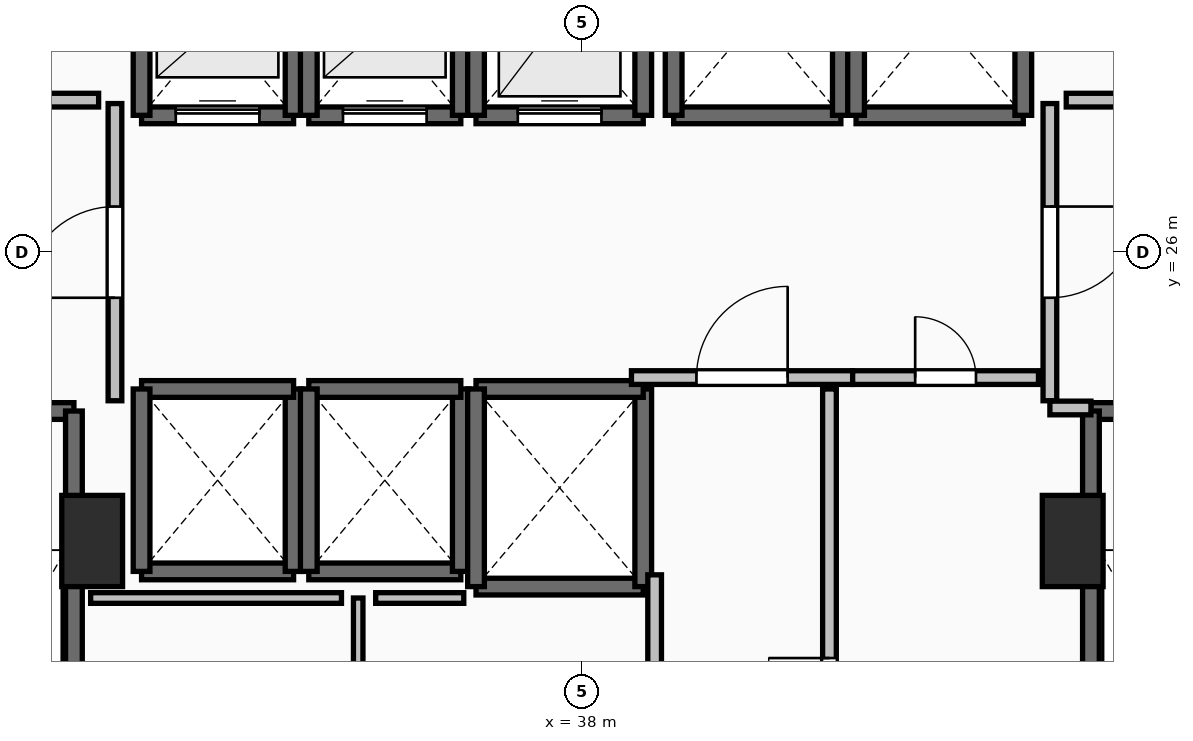
"""IFC4 building model, lengths in metres.
Left out: names, types, materials, properties, quantities, classifications, styles, units other than length and angle.
Written with IfcOpenShell. Run it as: python <this file> out.ifc"""

import sys

from ifc_helpers import new_model, si_unit, direction, frame, frame_2d, origin, origin_2d, place, context, subcontext, project, spatial, rectangle, extrude, element, fill, save


model = new_model("IFC4")
c1 = context("Model", 3, precision=1e-05, world=origin(), true_north=direction((0.0, 1.0)))
c2 = subcontext(c1, "Body", "Model", "MODEL_VIEW")
j1 = project(units=[si_unit("LENGTHUNIT", "METRE"), si_unit("PLANEANGLEUNIT", "RADIAN")], contexts=[c1])
p1 = place(None, origin())
s1 = spatial("IfcSite", under=j1, at=p1, CompositionType="ELEMENT")
p2 = place(p1, origin())
s2 = spatial("IfcBuilding", under=s1, at=p2, CompositionType="ELEMENT")
p3 = place(p2, frame((0.0, 0.0, 59.0)))
s3 = spatial("IfcBuildingStorey", under=s2, at=p3, CompositionType="ELEMENT", Elevation=59.0)
for number, where, z_axis, x_axis in (
    (1, (31.55, 22.2, 0.0), (0.0, 0.0, 1.0), (1.0, 0.0, 0.0)),
    (2, (44.45, 22.2, 0.0), (0.0, 0.0, 1.0), (1.0, 0.0, 0.0)),
):
    element("IfcColumn", number, at=place(p3, frame(where, z_axis=z_axis, x_axis=x_axis)), inside=s3, PredefinedType="PILASTER", context=c2, shape_type="SweptSolid", body=[
        extrude(rectangle(XDim=0.8, YDim=1.2, at=origin_2d()), origin(), (0.0, 0.0, 1.0), 3.5),
    ])
p4 = place(p3, frame((27.94, 23.91, 0.0), z_axis=(0.0, 0.0, 1.0), x_axis=(1.0, 0.0, 0.0)))
e3 = element("IfcWall", 3, at=p4, inside=s3, PredefinedType="SOLIDWALL", context=c2, shape_type="SweptSolid", body=[
    extrude(rectangle(XDim=3.37, YDim=0.22, at=frame_2d((1.685, 0.0))), origin(), (0.0, 0.0, 1.0), 3.24),
])
p5 = place(p4, frame((1.135, 0.0, 0.0)))
e4 = element("IfcOpeningElement", 4, at=p5, cuts=e3, PredefinedType="OPENING", context=c2, shape_type="SweptSolid", body=[
    extrude(rectangle(XDim=1.1, YDim=2.15, at=frame_2d((0.55, 1.075))), frame((0.0, 0.125, 0.0), z_axis=(0.0, -1.0, 0.0), x_axis=(1.0, 0.0, 0.0)), (0.0, 0.0, 1.0), 0.25),
])
p6 = place(p3, frame((31.31, 23.91, 0.0), z_axis=(0.0, 0.0, 1.0), x_axis=(0.0, -1.0, 0.0)))
e5 = element("IfcWall", 5, at=p6, inside=s3, PredefinedType="SOLIDWALL", context=c2, shape_type="SweptSolid", body=[
    extrude(rectangle(XDim=7.42, YDim=0.22, at=frame_2d((3.71, 0.0))), origin(), (0.0, 0.0, 1.0), 3.24),
])
p7 = place(p3, frame((44.69, 23.91, 0.0), z_axis=(0.0, 0.0, 1.0), x_axis=(1.0, 0.0, 0.0)))
e6 = element("IfcWall", 6, at=p7, inside=s3, PredefinedType="SOLIDWALL", context=c2, shape_type="SweptSolid", body=[
    extrude(rectangle(XDim=3.37, YDim=0.22, at=frame_2d((1.685, 0.0))), origin(), (0.0, 0.0, 1.0), 3.24),
])
p8 = place(p7, frame((1.135, 0.0, 0.0)))
e7 = element("IfcOpeningElement", 7, at=p8, cuts=e6, PredefinedType="OPENING", context=c2, shape_type="SweptSolid", body=[
    extrude(rectangle(XDim=1.1, YDim=2.15, at=frame_2d((0.55, 1.075))), frame((0.0, 0.125, 0.0), z_axis=(0.0, -1.0, 0.0), x_axis=(1.0, 0.0, 0.0)), (0.0, 0.0, 1.0), 0.25),
])
p9 = place(p3, frame((44.69, 16.49, 0.0), z_axis=(0.0, 0.0, 1.0), x_axis=(0.0, 1.0, 0.0)))
e8 = element("IfcWall", 8, at=p9, inside=s3, PredefinedType="SOLIDWALL", context=c2, shape_type="SweptSolid", body=[
    extrude(rectangle(XDim=7.42, YDim=0.22, at=frame_2d((3.71, 0.0))), origin(), (0.0, 0.0, 1.0), 3.24),
])
p10 = place(p3, frame((32.2, 27.8, 0.0), z_axis=(0.0, 0.0, 1.0), x_axis=(1.0, 0.0, 0.0)))
e9 = element("IfcWall", 9, at=p10, inside=s3, PredefinedType="SOLIDWALL", context=c2, shape_type="SweptSolid", body=[
    extrude(rectangle(XDim=2.0, YDim=0.22, at=frame_2d((1.0, 0.0))), origin(), (0.0, 0.0, 1.0), 3.24),
])
p11 = place(p10, frame((0.45, 0.0, 0.0)))
e10 = element("IfcOpeningElement", 10, at=p11, cuts=e9, PredefinedType="OPENING", context=c2, shape_type="SweptSolid", body=[
    extrude(rectangle(XDim=1.1, YDim=2.2, at=frame_2d((0.55, 1.1))), frame((0.0, 0.125, 0.0), z_axis=(0.0, -1.0, 0.0), x_axis=(1.0, 0.0, 0.0)), (0.0, 0.0, 1.0), 0.25),
])
for number, where, z_axis, x_axis in (
    (11, (34.2, 27.8, 0.0), (0.0, 0.0, 1.0), (0.0, 1.0, 0.0)),
    (12, (32.2, 30.2, 0.0), (0.0, 0.0, 1.0), (0.0, -1.0, 0.0)),
):
    element("IfcWall", number, at=place(p3, frame(where, z_axis=z_axis, x_axis=x_axis)), inside=s3, PredefinedType="SOLIDWALL", context=c2, shape_type="SweptSolid", body=[
        extrude(rectangle(XDim=2.4, YDim=0.22, at=frame_2d((1.2, 0.0))), origin(), (0.0, 0.0, 1.0), 3.24),
    ])
p12 = place(p3, frame((34.4, 27.8, 0.0), z_axis=(0.0, 0.0, 1.0), x_axis=(1.0, 0.0, 0.0)))
e13 = element("IfcWall", 13, at=p12, inside=s3, PredefinedType="SOLIDWALL", context=c2, shape_type="SweptSolid", body=[
    extrude(rectangle(XDim=2.0, YDim=0.22, at=frame_2d((1.0, 0.0))), origin(), (0.0, 0.0, 1.0), 3.24),
])
p13 = place(p12, frame((0.45, 0.0, 0.0)))
e14 = element("IfcOpeningElement", 14, at=p13, cuts=e13, PredefinedType="OPENING", context=c2, shape_type="SweptSolid", body=[
    extrude(rectangle(XDim=1.1, YDim=2.2, at=frame_2d((0.55, 1.1))), frame((0.0, 0.125, 0.0), z_axis=(0.0, -1.0, 0.0), x_axis=(1.0, 0.0, 0.0)), (0.0, 0.0, 1.0), 0.25),
])
for number, where, z_axis, x_axis in (
    (15, (36.4, 27.8, 0.0), (0.0, 0.0, 1.0), (0.0, 1.0, 0.0)),
    (16, (34.4, 30.2, 0.0), (0.0, 0.0, 1.0), (0.0, -1.0, 0.0)),
):
    element("IfcWall", number, at=place(p3, frame(where, z_axis=z_axis, x_axis=x_axis)), inside=s3, PredefinedType="SOLIDWALL", context=c2, shape_type="SweptSolid", body=[
        extrude(rectangle(XDim=2.4, YDim=0.22, at=frame_2d((1.2, 0.0))), origin(), (0.0, 0.0, 1.0), 3.24),
    ])
p14 = place(p3, frame((36.6, 27.8, 0.0), z_axis=(0.0, 0.0, 1.0), x_axis=(1.0, 0.0, 0.0)))
e17 = element("IfcWall", 17, at=p14, inside=s3, PredefinedType="SOLIDWALL", context=c2, shape_type="SweptSolid", body=[
    extrude(rectangle(XDim=2.2, YDim=0.22, at=frame_2d((1.1, 0.0))), origin(), (0.0, 0.0, 1.0), 3.24),
])
p15 = place(p14, frame((0.55, 0.0, 0.0)))
e18 = element("IfcOpeningElement", 18, at=p15, cuts=e17, PredefinedType="OPENING", context=c2, shape_type="SweptSolid", body=[
    extrude(rectangle(XDim=1.1, YDim=2.2, at=frame_2d((0.55, 1.1))), frame((0.0, 0.125, 0.0), z_axis=(0.0, -1.0, 0.0), x_axis=(1.0, 0.0, 0.0)), (0.0, 0.0, 1.0), 0.25),
])
for number, where, z_axis, x_axis in (
    (19, (38.8, 27.8, 0.0), (0.0, 0.0, 1.0), (0.0, 1.0, 0.0)),
    (20, (36.6, 30.4, 0.0), (0.0, 0.0, 1.0), (0.0, -1.0, 0.0)),
):
    element("IfcWall", number, at=place(p3, frame(where, z_axis=z_axis, x_axis=x_axis)), inside=s3, PredefinedType="SOLIDWALL", context=c2, shape_type="SweptSolid", body=[
        extrude(rectangle(XDim=2.6, YDim=0.22, at=frame_2d((1.3, 0.0))), origin(), (0.0, 0.0, 1.0), 3.24),
    ])
p16 = place(p3, frame((32.2, 21.8, 0.0), z_axis=(0.0, 0.0, 1.0), x_axis=(1.0, 0.0, 0.0)))
e21 = element("IfcWall", 21, at=p16, inside=s3, PredefinedType="SOLIDWALL", context=c2, shape_type="SweptSolid", body=[
    extrude(rectangle(XDim=2.0, YDim=0.22, at=frame_2d((1.0, 0.0))), origin(), (0.0, 0.0, 1.0), 3.24),
])
p17 = place(p3, frame((34.2, 21.8, 0.0), z_axis=(0.0, 0.0, 1.0), x_axis=(0.0, 1.0, 0.0)))
e22 = element("IfcWall", 22, at=p17, inside=s3, PredefinedType="SOLIDWALL", context=c2, shape_type="SweptSolid", body=[
    extrude(rectangle(XDim=2.4, YDim=0.22, at=frame_2d((1.2, 0.0))), origin(), (0.0, 0.0, 1.0), 3.24),
])
p18 = place(p3, frame((34.2, 24.2, 0.0), z_axis=(0.0, 0.0, 1.0), x_axis=(-1.0, 0.0, 0.0)))
e23 = element("IfcWall", 23, at=p18, inside=s3, PredefinedType="SOLIDWALL", context=c2, shape_type="SweptSolid", body=[
    extrude(rectangle(XDim=2.0, YDim=0.22, at=frame_2d((1.0, 0.0))), origin(), (0.0, 0.0, 1.0), 3.24),
])
p19 = place(p3, frame((32.2, 24.2, 0.0), z_axis=(0.0, 0.0, 1.0), x_axis=(0.0, -1.0, 0.0)))
e24 = element("IfcWall", 24, at=p19, inside=s3, PredefinedType="SOLIDWALL", context=c2, shape_type="SweptSolid", body=[
    extrude(rectangle(XDim=2.4, YDim=0.22, at=frame_2d((1.2, 0.0))), origin(), (0.0, 0.0, 1.0), 3.24),
])
p20 = place(p3, frame((34.4, 21.8, 0.0), z_axis=(0.0, 0.0, 1.0), x_axis=(1.0, 0.0, 0.0)))
e25 = element("IfcWall", 25, at=p20, inside=s3, PredefinedType="SOLIDWALL", context=c2, shape_type="SweptSolid", body=[
    extrude(rectangle(XDim=2.0, YDim=0.22, at=frame_2d((1.0, 0.0))), origin(), (0.0, 0.0, 1.0), 3.24),
])
p21 = place(p3, frame((36.4, 21.8, 0.0), z_axis=(0.0, 0.0, 1.0), x_axis=(0.0, 1.0, 0.0)))
e26 = element("IfcWall", 26, at=p21, inside=s3, PredefinedType="SOLIDWALL", context=c2, shape_type="SweptSolid", body=[
    extrude(rectangle(XDim=2.4, YDim=0.22, at=frame_2d((1.2, 0.0))), origin(), (0.0, 0.0, 1.0), 3.24),
])
p22 = place(p3, frame((36.4, 24.2, 0.0), z_axis=(0.0, 0.0, 1.0), x_axis=(-1.0, 0.0, 0.0)))
e27 = element("IfcWall", 27, at=p22, inside=s3, PredefinedType="SOLIDWALL", context=c2, shape_type="SweptSolid", body=[
    extrude(rectangle(XDim=2.0, YDim=0.22, at=frame_2d((1.0, 0.0))), origin(), (0.0, 0.0, 1.0), 3.24),
])
p23 = place(p3, frame((34.4, 24.2, 0.0), z_axis=(0.0, 0.0, 1.0), x_axis=(0.0, -1.0, 0.0)))
e28 = element("IfcWall", 28, at=p23, inside=s3, PredefinedType="SOLIDWALL", context=c2, shape_type="SweptSolid", body=[
    extrude(rectangle(XDim=2.4, YDim=0.22, at=frame_2d((1.2, 0.0))), origin(), (0.0, 0.0, 1.0), 3.24),
])
p24 = place(p3, frame((36.6, 21.6, 0.0), z_axis=(0.0, 0.0, 1.0), x_axis=(1.0, 0.0, 0.0)))
e29 = element("IfcWall", 29, at=p24, inside=s3, PredefinedType="SOLIDWALL", context=c2, shape_type="SweptSolid", body=[
    extrude(rectangle(XDim=2.2, YDim=0.22, at=frame_2d((1.1, 0.0))), origin(), (0.0, 0.0, 1.0), 3.24),
])
p25 = place(p3, frame((38.8, 21.6, 0.0), z_axis=(0.0, 0.0, 1.0), x_axis=(0.0, 1.0, 0.0)))
e30 = element("IfcWall", 30, at=p25, inside=s3, PredefinedType="SOLIDWALL", context=c2, shape_type="SweptSolid", body=[
    extrude(rectangle(XDim=2.6, YDim=0.22, at=frame_2d((1.3, 0.0))), origin(), (0.0, 0.0, 1.0), 3.24),
])
p26 = place(p3, frame((38.8, 24.2, 0.0), z_axis=(0.0, 0.0, 1.0), x_axis=(-1.0, 0.0, 0.0)))
e31 = element("IfcWall", 31, at=p26, inside=s3, PredefinedType="SOLIDWALL", context=c2, shape_type="SweptSolid", body=[
    extrude(rectangle(XDim=2.2, YDim=0.22, at=frame_2d((1.1, 0.0))), origin(), (0.0, 0.0, 1.0), 3.24),
])
p27 = place(p3, frame((36.6, 24.2, 0.0), z_axis=(0.0, 0.0, 1.0), x_axis=(0.0, -1.0, 0.0)))
e32 = element("IfcWall", 32, at=p27, inside=s3, PredefinedType="SOLIDWALL", context=c2, shape_type="SweptSolid", body=[
    extrude(rectangle(XDim=2.6, YDim=0.22, at=frame_2d((1.3, 0.0))), origin(), (0.0, 0.0, 1.0), 3.24),
])
p28 = place(p3, frame((39.2, 27.8, 0.0), z_axis=(0.0, 0.0, 1.0), x_axis=(1.0, 0.0, 0.0)))
e33 = element("IfcWall", 33, at=p28, inside=s3, PredefinedType="SOLIDWALL", context=c2, shape_type="SweptSolid", body=[
    extrude(rectangle(XDim=2.2, YDim=0.22, at=frame_2d((1.1, 0.0))), origin(), (0.0, 0.0, 1.0), 3.24),
])
for number, where, z_axis, x_axis in (
    (34, (41.4, 27.8, 0.0), (0.0, 0.0, 1.0), (0.0, 1.0, 0.0)),
    (35, (39.2, 30.4, 0.0), (0.0, 0.0, 1.0), (0.0, -1.0, 0.0)),
):
    element("IfcWall", number, at=place(p3, frame(where, z_axis=z_axis, x_axis=x_axis)), inside=s3, PredefinedType="SOLIDWALL", context=c2, shape_type="SweptSolid", body=[
        extrude(rectangle(XDim=2.6, YDim=0.22, at=frame_2d((1.3, 0.0))), origin(), (0.0, 0.0, 1.0), 3.24),
    ])
p29 = place(p3, frame((41.6, 27.8, 0.0), z_axis=(0.0, 0.0, 1.0), x_axis=(1.0, 0.0, 0.0)))
e36 = element("IfcWall", 36, at=p29, inside=s3, PredefinedType="SOLIDWALL", context=c2, shape_type="SweptSolid", body=[
    extrude(rectangle(XDim=2.2, YDim=0.22, at=frame_2d((1.1, 0.0))), origin(), (0.0, 0.0, 1.0), 3.24),
])
for number, where, z_axis, x_axis in (
    (37, (43.8, 27.8, 0.0), (0.0, 0.0, 1.0), (0.0, 1.0, 0.0)),
    (38, (41.6, 30.4, 0.0), (0.0, 0.0, 1.0), (0.0, -1.0, 0.0)),
):
    element("IfcWall", number, at=place(p3, frame(where, z_axis=z_axis, x_axis=x_axis)), inside=s3, PredefinedType="SOLIDWALL", context=c2, shape_type="SweptSolid", body=[
        extrude(rectangle(XDim=2.6, YDim=0.22, at=frame_2d((1.3, 0.0))), origin(), (0.0, 0.0, 1.0), 3.24),
    ])
p30 = place(p3, frame((31.85, 24.045, 0.0), z_axis=(0.0, 0.0, 1.0), x_axis=(0.0, 1.0, 0.0)))
e39 = element("IfcWall", 39, at=p30, inside=s3, PredefinedType="PARTITIONING", context=c2, shape_type="SweptSolid", body=[
    extrude(rectangle(XDim=3.91, YDim=0.18, at=frame_2d((1.955, 0.0))), origin(), (0.0, 0.0, 1.0), 3.24),
])
p31 = place(p30, frame((1.355, 0.0, 0.0)))
e40 = element("IfcOpeningElement", 40, at=p31, cuts=e39, PredefinedType="OPENING", context=c2, shape_type="SweptSolid", body=[
    extrude(rectangle(XDim=1.2, YDim=2.15, at=frame_2d((0.6, 1.075))), frame((0.0, 0.105, 0.0), z_axis=(0.0, -1.0, 0.0), x_axis=(1.0, 0.0, 0.0)), (0.0, 0.0, 1.0), 0.21),
])
p32 = place(p3, frame((44.15, 27.955, 0.0), z_axis=(0.0, 0.0, 1.0), x_axis=(0.0, -1.0, 0.0)))
e41 = element("IfcWall", 41, at=p32, inside=s3, PredefinedType="PARTITIONING", context=c2, shape_type="SweptSolid", body=[
    extrude(rectangle(XDim=3.91, YDim=0.18, at=frame_2d((1.955, 0.0))), origin(), (0.0, 0.0, 1.0), 3.24),
])
p33 = place(p32, frame((1.355, 0.0, 0.0)))
e42 = element("IfcOpeningElement", 42, at=p33, cuts=e41, PredefinedType="OPENING", context=c2, shape_type="SweptSolid", body=[
    extrude(rectangle(XDim=1.2, YDim=2.15, at=frame_2d((0.6, 1.075))), frame((0.0, 0.105, 0.0), z_axis=(0.0, -1.0, 0.0), x_axis=(1.0, 0.0, 0.0)), (0.0, 0.0, 1.0), 0.21),
])
p34 = place(p3, frame((44.15, 23.95, 0.0), z_axis=(0.0, 0.0, 1.0), x_axis=(1.0, 0.0, 0.0)))
e43 = element("IfcWall", 43, at=p34, inside=s3, PredefinedType="PARTITIONING", context=c2, shape_type="SweptSolid", body=[
    extrude(rectangle(XDim=0.54, YDim=0.18, at=frame_2d((0.27, 0.0))), origin(), (0.0, 0.0, 1.0), 3.24),
])
p35 = place(p3, frame((38.645, 24.35, 0.0), z_axis=(0.0, 0.0, 1.0), x_axis=(1.0, 0.0, 0.0)))
e44 = element("IfcWall", 44, at=p35, inside=s3, PredefinedType="PARTITIONING", context=c2, shape_type="SweptSolid", body=[
    extrude(rectangle(XDim=2.91, YDim=0.18, at=frame_2d((1.455, 0.0))), origin(), (0.0, 0.0, 1.0), 3.24),
])
p36 = place(p35, frame((0.855, 0.0, 0.0)))
e45 = element("IfcOpeningElement", 45, at=p36, cuts=e44, PredefinedType="OPENING", context=c2, shape_type="SweptSolid", body=[
    extrude(rectangle(XDim=1.2, YDim=2.15, at=frame_2d((0.6, 1.075))), frame((0.0, 0.105, 0.0), z_axis=(0.0, -1.0, 0.0), x_axis=(1.0, 0.0, 0.0)), (0.0, 0.0, 1.0), 0.21),
])
p37 = place(p3, frame((41.555, 24.35, 0.0), z_axis=(0.0, 0.0, 1.0), x_axis=(1.0, 0.0, 0.0)))
e46 = element("IfcWall", 46, at=p37, inside=s3, PredefinedType="PARTITIONING", context=c2, shape_type="SweptSolid", body=[
    extrude(rectangle(XDim=2.445, YDim=0.18, at=frame_2d((1.223, 0.0))), origin(), (0.0, 0.0, 1.0), 3.24),
])
p38 = place(p37, frame((0.823, 0.0, 0.0)))
e47 = element("IfcOpeningElement", 47, at=p38, cuts=e46, PredefinedType="OPENING", context=c2, shape_type="SweptSolid", body=[
    extrude(rectangle(XDim=0.8, YDim=2.05, at=frame_2d((0.4, 1.025))), frame((0.0, 0.105, 0.0), z_axis=(0.0, -1.0, 0.0), x_axis=(1.0, 0.0, 0.0)), (0.0, 0.0, 1.0), 0.21),
])
p39 = place(p3, frame((41.25, 16.32, 0.0), z_axis=(0.0, 0.0, 1.0), x_axis=(0.0, 1.0, 0.0)))
e48 = element("IfcWall", 48, at=p39, inside=s3, PredefinedType="PARTITIONING", context=c2, shape_type="SweptSolid", body=[
    extrude(rectangle(XDim=7.88, YDim=0.18, at=frame_2d((3.94, 0.0))), origin(), (0.0, 0.0, 1.0), 3.24),
])
p40 = place(p39, frame((3.54, 0.0, 0.0)))
e49 = element("IfcOpeningElement", 49, at=p40, cuts=e48, PredefinedType="OPENING", context=c2, shape_type="SweptSolid", body=[
    extrude(rectangle(XDim=0.8, YDim=2.05, at=frame_2d((0.4, 1.025))), frame((0.0, 0.105, 0.0), z_axis=(0.0, -1.0, 0.0), x_axis=(1.0, 0.0, 0.0)), (0.0, 0.0, 1.0), 0.21),
])
p41 = place(p3, frame((38.95, 21.755, 0.0), z_axis=(0.0, 0.0, 1.0), x_axis=(0.0, -1.0, 0.0)))
e50 = element("IfcWall", 50, at=p41, inside=s3, PredefinedType="PARTITIONING", context=c2, shape_type="SweptSolid", body=[
    extrude(rectangle(XDim=5.435, YDim=0.18, at=frame_2d((2.717, 0.0))), origin(), (0.0, 0.0, 1.0), 3.24),
])
p42 = place(p41, frame((2.292, 0.0, 0.0)))
e51 = element("IfcOpeningElement", 51, at=p42, cuts=e50, PredefinedType="OPENING", context=c2, shape_type="SweptSolid", body=[
    extrude(rectangle(XDim=0.85, YDim=2.1, at=frame_2d((0.425, 1.05))), frame((0.0, 0.105, 0.0), z_axis=(0.0, -1.0, 0.0), x_axis=(1.0, 0.0, 0.0)), (0.0, 0.0, 1.0), 0.21),
])
p43 = place(p3, frame((35.05, 16.32, 0.0), z_axis=(0.0, 0.0, 1.0), x_axis=(0.0, 1.0, 0.0)))
e52 = element("IfcWall", 52, at=p43, inside=s3, PredefinedType="PARTITIONING", context=c2, shape_type="SweptSolid", body=[
    extrude(rectangle(XDim=5.13, YDim=0.125, at=frame_2d((2.565, 0.0))), origin(), (0.0, 0.0, 1.0), 3.24),
])
for number, where, z_axis, x_axis in (
    (53, (31.635, 28.0, 0.0), (0.0, 0.0, 1.0), (-1.0, 0.0, 0.0)),
    (54, (45.28, 28.0, 0.0), (0.0, 0.0, 1.0), (-1.0, 0.0, 0.0)),
):
    element("IfcWall", number, at=place(p3, frame(where, z_axis=z_axis, x_axis=x_axis)), inside=s3, PredefinedType="PARTITIONING", context=c2, shape_type="SweptSolid", body=[
        extrude(rectangle(XDim=0.915, YDim=0.18, at=frame_2d((0.458, 0.0))), origin(), (0.0, 0.0, 1.0), 3.24),
    ])
p44 = place(p3, frame((34.83, 21.45, 0.0), z_axis=(0.0, 0.0, 1.0), x_axis=(-1.0, 0.0, 0.0)))
e55 = element("IfcWall", 55, at=p44, inside=s3, PredefinedType="PARTITIONING", context=c2, shape_type="SweptSolid", body=[
    extrude(rectangle(XDim=3.3, YDim=0.14, at=frame_2d((1.65, 0.0))), origin(), (0.0, 0.0, 1.0), 3.24),
])
p45 = place(p3, frame((36.439, 21.45, 0.0), z_axis=(0.0, 0.0, 1.0), x_axis=(-1.0, 0.0, 0.0)))
e56 = element("IfcWall", 56, at=p45, inside=s3, PredefinedType="PARTITIONING", context=c2, shape_type="SweptSolid", body=[
    extrude(rectangle(XDim=1.159, YDim=0.14, at=frame_2d((0.58, 0.0))), origin(), (0.0, 0.0, 1.0), 3.24),
])
p46 = place(p11, origin())
e57 = element("IfcDoor", 57, at=p46, inside=s3, OperationType="SLIDING_TO_LEFT", PredefinedType="DOOR", context=c2, shape_type="SweptSolid", body=[
    extrude(rectangle(XDim=1.1, YDim=2.2, at=frame_2d((0.55, 1.1))), frame((0.0, 0.025, 0.0), z_axis=(0.0, -1.0, 0.0), x_axis=(1.0, 0.0, 0.0)), (0.0, 0.0, 1.0), 0.05),
])
fill(e10, e57)
p47 = place(p13, origin())
e58 = element("IfcDoor", 58, at=p47, inside=s3, OperationType="SLIDING_TO_LEFT", PredefinedType="DOOR", context=c2, shape_type="SweptSolid", body=[
    extrude(rectangle(XDim=1.1, YDim=2.2, at=frame_2d((0.55, 1.1))), frame((0.0, 0.025, 0.0), z_axis=(0.0, -1.0, 0.0), x_axis=(1.0, 0.0, 0.0)), (0.0, 0.0, 1.0), 0.05),
])
fill(e14, e58)
p48 = place(p15, origin())
e59 = element("IfcDoor", 59, at=p48, inside=s3, OperationType="SLIDING_TO_LEFT", PredefinedType="DOOR", context=c2, shape_type="SweptSolid", body=[
    extrude(rectangle(XDim=1.1, YDim=2.2, at=frame_2d((0.55, 1.1))), frame((0.0, 0.025, 0.0), z_axis=(0.0, -1.0, 0.0), x_axis=(1.0, 0.0, 0.0)), (0.0, 0.0, 1.0), 0.05),
])
fill(e18, e59)
p49 = place(p31, origin())
e60 = element("IfcDoor", 60, at=p49, inside=s3, OperationType="SINGLE_SWING_LEFT", PredefinedType="DOOR", context=c2, shape_type="SweptSolid", body=[
    extrude(rectangle(XDim=1.2, YDim=2.15, at=frame_2d((0.6, 1.075))), frame((0.0, 0.025, 0.0), z_axis=(0.0, -1.0, 0.0), x_axis=(1.0, 0.0, 0.0)), (0.0, 0.0, 1.0), 0.05),
])
fill(e40, e60)
p50 = place(p33, origin())
e61 = element("IfcDoor", 61, at=p50, inside=s3, OperationType="SINGLE_SWING_LEFT", PredefinedType="DOOR", context=c2, shape_type="SweptSolid", body=[
    extrude(rectangle(XDim=1.2, YDim=2.15, at=frame_2d((0.6, 1.075))), frame((0.0, 0.025, 0.0), z_axis=(0.0, -1.0, 0.0), x_axis=(1.0, 0.0, 0.0)), (0.0, 0.0, 1.0), 0.05),
])
fill(e42, e61)
p51 = place(p36, origin())
e62 = element("IfcDoor", 62, at=p51, inside=s3, OperationType="SINGLE_SWING_RIGHT", PredefinedType="DOOR", context=c2, shape_type="SweptSolid", body=[
    extrude(rectangle(XDim=1.2, YDim=2.15, at=frame_2d((0.6, 1.075))), frame((0.0, 0.025, 0.0), z_axis=(0.0, -1.0, 0.0), x_axis=(1.0, 0.0, 0.0)), (0.0, 0.0, 1.0), 0.05),
])
fill(e45, e62)
p52 = place(p38, origin())
e63 = element("IfcDoor", 63, at=p52, inside=s3, OperationType="SINGLE_SWING_LEFT", PredefinedType="DOOR", context=c2, shape_type="SweptSolid", body=[
    extrude(rectangle(XDim=0.8, YDim=2.05, at=frame_2d((0.4, 1.025))), frame((0.0, 0.025, 0.0), z_axis=(0.0, -1.0, 0.0), x_axis=(1.0, 0.0, 0.0)), (0.0, 0.0, 1.0), 0.05),
])
fill(e47, e63)
p53 = place(p40, origin())
e64 = element("IfcDoor", 64, at=p53, inside=s3, OperationType="SINGLE_SWING_RIGHT", PredefinedType="DOOR", context=c2, shape_type="SweptSolid", body=[
    extrude(rectangle(XDim=0.8, YDim=2.05, at=frame_2d((0.4, 1.025))), frame((0.0, 0.025, 0.0), z_axis=(0.0, -1.0, 0.0), x_axis=(1.0, 0.0, 0.0)), (0.0, 0.0, 1.0), 0.05),
])
fill(e49, e64)
save(model, sys.argv[1])
